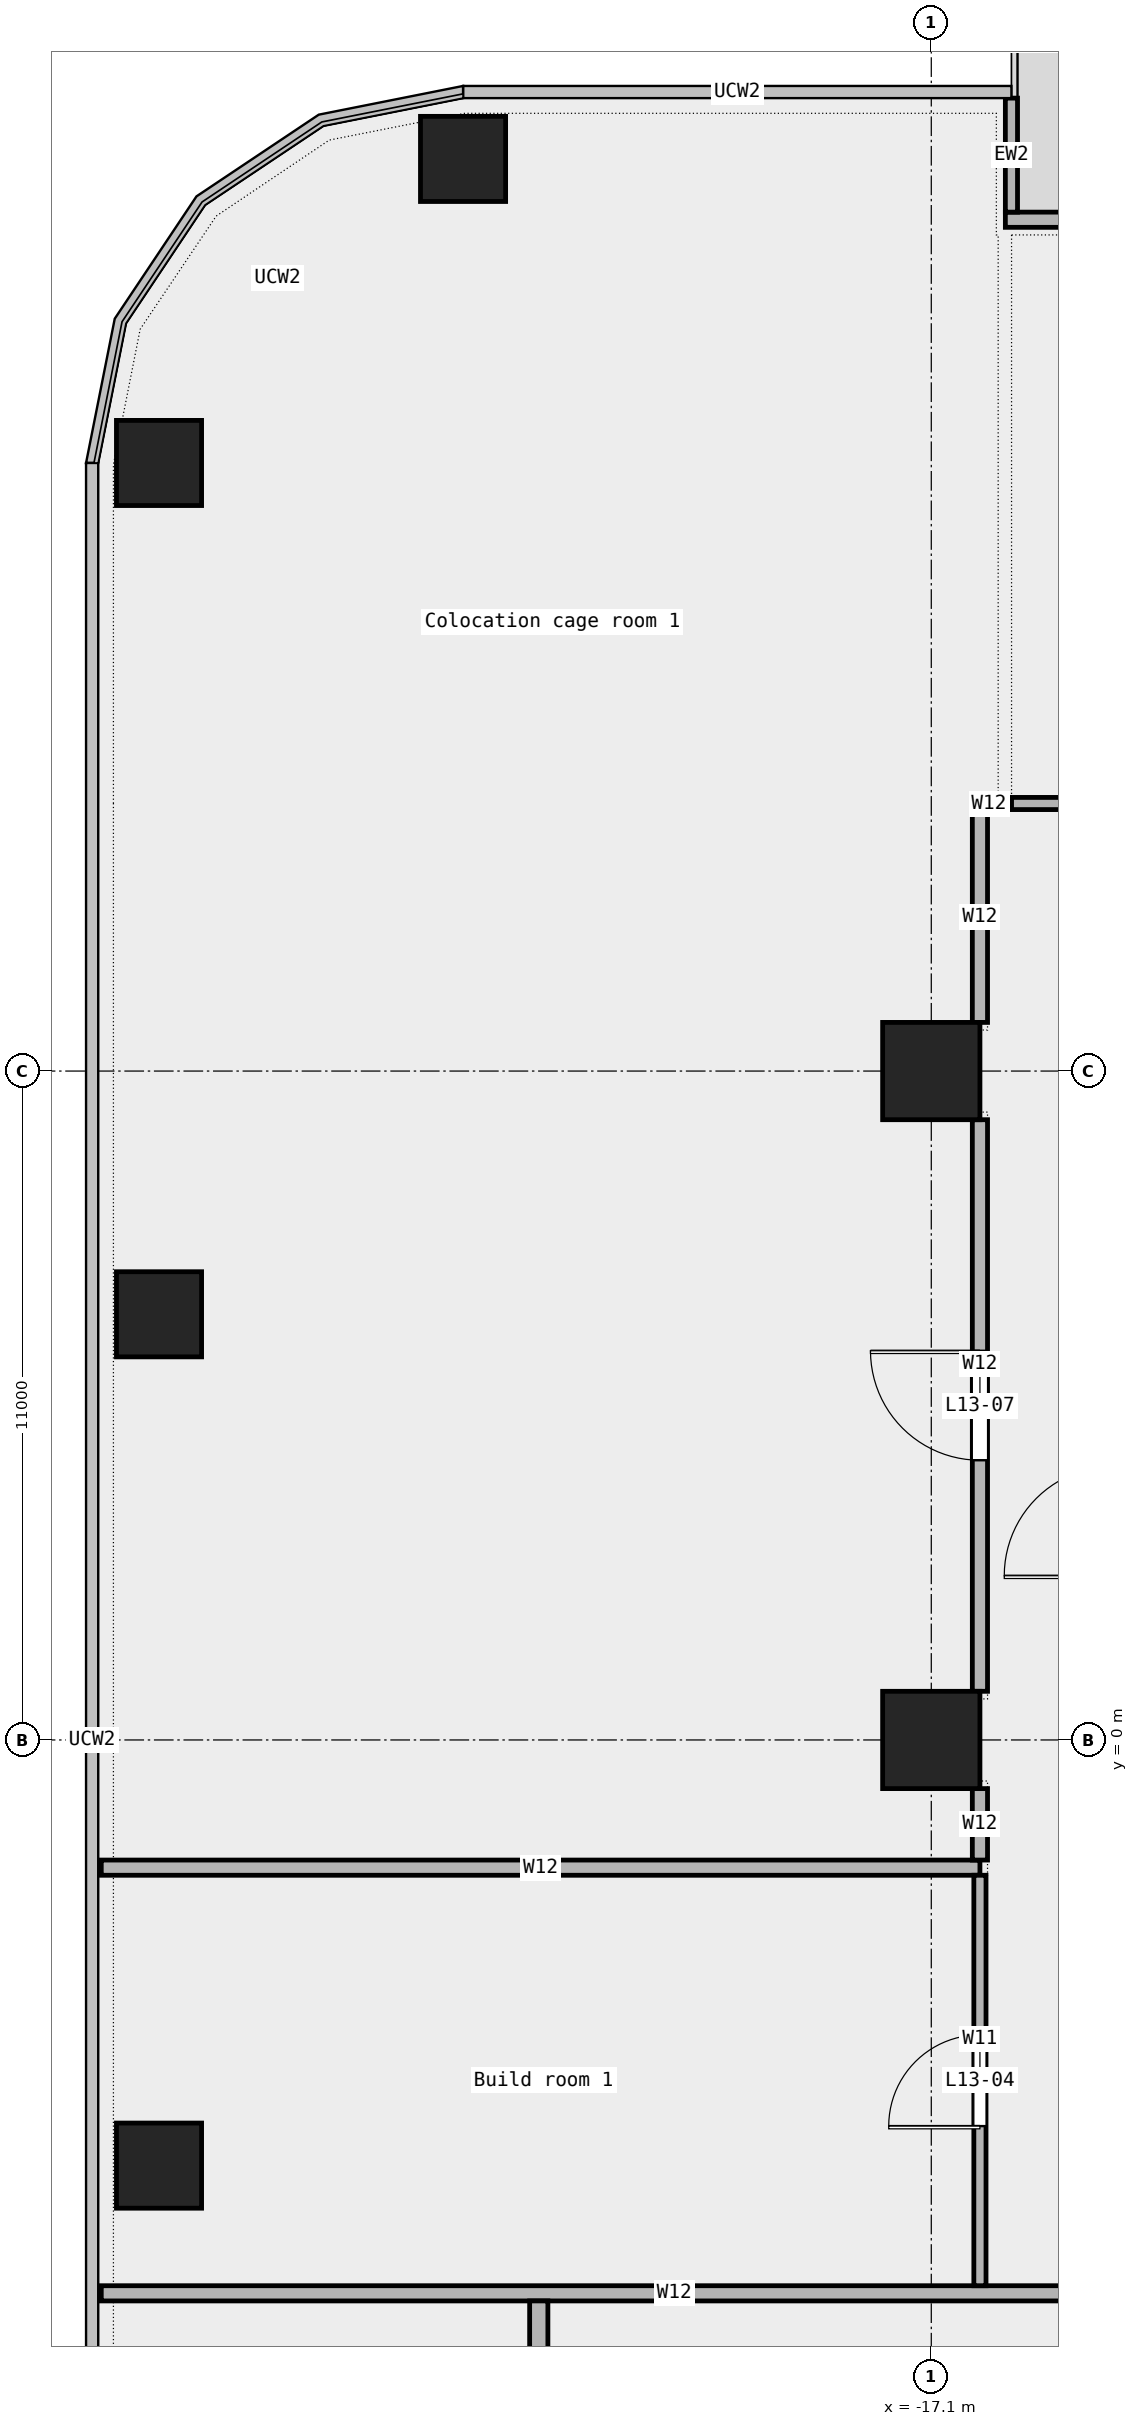
"""IFC4 building model, lengths in metres.
Left out: names, types, materials, properties, quantities, classifications, styles, units other than length and angle.
Written with IfcOpenShell. Run it as: python <this file> out.ifc"""

import sys

from ifc_helpers import new_model, si_unit, direction, frame, frame_2d, origin, origin_2d, place, context, subcontext, project, spatial, rectangle, extrude, element, fill, save


model = new_model("IFC4")
c1 = context("Model", 3, precision=1e-05, world=origin(), true_north=direction((0.0, 1.0)))
c2 = subcontext(c1, "Body", "Model", "MODEL_VIEW")
j1 = project(units=[si_unit("LENGTHUNIT", "METRE"), si_unit("PLANEANGLEUNIT", "RADIAN")], contexts=[c1])
p1 = place(None, origin())
s1 = spatial("IfcSite", under=j1, at=p1, CompositionType="ELEMENT")
p2 = place(p1, origin())
s2 = spatial("IfcBuilding", under=s1, at=p2, CompositionType="ELEMENT")
p3 = place(p2, frame((0.0, 0.0, 69.4)))
s3 = spatial("IfcBuildingStorey", under=s2, at=p3, CompositionType="ELEMENT", Elevation=69.4)
for number, where, z_axis, x_axis in (
    (1, (-24.8, 26.0, 0.0), (0.0, 0.0, 1.0), (1.0, 0.0, 0.0)),
    (2, (-29.8, 21.0, 0.0), (0.0, 0.0, 1.0), (1.0, 0.0, 0.0)),
    (3, (-29.8, 7.0, 0.0), (0.0, 0.0, 1.0), (1.0, 0.0, 0.0)),
    (4, (-29.8, -7.0, 0.0), (0.0, 0.0, 1.0), (1.0, 0.0, 0.0)),
):
    element("IfcColumn", number, at=place(p3, frame(where, z_axis=z_axis, x_axis=x_axis)), inside=s3, PredefinedType="COLUMN", context=c2, shape_type="SweptSolid", body=[
        extrude(rectangle(XDim=1.4, YDim=1.4, at=origin_2d()), origin(), (0.0, 0.0, 1.0), 4.35),
    ])
for number, where, z_axis, x_axis in (
    (5, (-17.1, 0.0, 0.0), (0.0, 0.0, 1.0), (1.0, 0.0, 0.0)),
    (6, (-17.1, 11.0, 0.0), (0.0, 0.0, 1.0), (1.0, 0.0, 0.0)),
):
    element("IfcColumn", number, at=place(p3, frame(where, z_axis=z_axis, x_axis=x_axis)), inside=s3, PredefinedType="COLUMN", context=c2, shape_type="SweptSolid", body=[
        extrude(rectangle(XDim=1.6, YDim=1.6, at=origin_2d()), origin(), (0.0, 0.0, 1.0), 4.35),
    ])
p4 = place(p3, frame((-2.155, 25.0, 0.0), z_axis=(0.0, 0.0, 1.0), x_axis=(-1.0, 0.0, 0.0)))
e7 = element("IfcWall", 7, at=p4, inside=s3, PredefinedType="STANDARD", context=c2, shape_type="SweptSolid", body=[
    extrude(rectangle(XDim=13.727, YDim=0.25, at=frame_2d((6.864, 0.0))), origin(), (0.0, 0.0, 1.0), 4.35),
])
p5 = place(p4, frame((1.75, 0.0, 0.45)))
e8 = element("IfcOpeningElement", 8, at=p5, cuts=e7, PredefinedType="OPENING", context=c2, shape_type="SweptSolid", body=[
    extrude(rectangle(XDim=1.5, YDim=3.0, at=frame_2d((0.75, 1.5))), frame((0.0, 0.137, 0.0), z_axis=(0.0, -1.0, 0.0), x_axis=(1.0, 0.0, 0.0)), (0.0, 0.0, 1.0), 0.274),
])
p6 = place(p4, frame((6.0, 0.0, 0.0)))
e9 = element("IfcOpeningElement", 9, at=p6, cuts=e7, PredefinedType="OPENING", context=c2, shape_type="SweptSolid", body=[
    extrude(rectangle(XDim=1.8, YDim=2.4, at=frame_2d((0.9, 1.2))), frame((0.0, 0.137, 0.0), z_axis=(0.0, -1.0, 0.0), x_axis=(1.0, 0.0, 0.0)), (0.0, 0.0, 1.0), 0.274),
])
p7 = place(p4, frame((11.25, 0.0, 0.45)))
e10 = element("IfcOpeningElement", 10, at=p7, cuts=e7, PredefinedType="OPENING", context=c2, shape_type="SweptSolid", body=[
    extrude(rectangle(XDim=1.5, YDim=3.0, at=frame_2d((0.75, 1.5))), frame((0.0, 0.137, 0.0), z_axis=(0.0, -1.0, 0.0), x_axis=(1.0, 0.0, 0.0)), (0.0, 0.0, 1.0), 0.274),
])
p8 = place(p3, frame((-15.782, 27.0, 0.0), z_axis=(0.0, 0.0, 1.0), x_axis=(0.0, -1.0, 0.0)))
e11 = element("IfcWall", 11, at=p8, inside=s3, PredefinedType="STANDARD", context=c2, shape_type="SweptSolid", body=[
    extrude(rectangle(XDim=1.875, YDim=0.2, at=frame_2d((0.938, 0.0))), origin(), (0.0, 0.0, 1.0), 4.35),
])
p9 = place(p3, frame((-30.75, -9.1, 0.0), z_axis=(0.0, 0.0, 1.0), x_axis=(1.0, 0.0, 0.0)))
e12 = element("IfcWall", 12, at=p9, inside=s3, PredefinedType="PARTITIONING", context=c2, shape_type="SweptSolid", body=[
    extrude(rectangle(XDim=18.85, YDim=0.25, at=frame_2d((9.425, 0.0))), origin(), (0.0, 0.0, 1.0), 4.35),
])
p10 = place(p3, frame((-30.75, -2.1, 0.0), z_axis=(0.0, 0.0, 1.0), x_axis=(1.0, 0.0, 0.0)))
e13 = element("IfcWall", 13, at=p10, inside=s3, PredefinedType="PARTITIONING", context=c2, shape_type="SweptSolid", body=[
    extrude(rectangle(XDim=14.45, YDim=0.25, at=frame_2d((7.225, 0.0))), origin(), (0.0, 0.0, 1.0), 4.35),
])
p11 = place(p3, frame((-15.78, 15.4, 0.0), z_axis=(0.0, 0.0, 1.0), x_axis=(1.0, 0.0, 0.0)))
e14 = element("IfcWall", 14, at=p11, inside=s3, PredefinedType="PARTITIONING", context=c2, shape_type="SweptSolid", body=[
    extrude(rectangle(XDim=25.965, YDim=0.2, at=frame_2d((12.982, 0.0))), origin(), (0.0, 0.0, 1.0), 4.35),
])
p12 = place(p11, frame((19.395, 0.0, 0.0)))
e15 = element("IfcOpeningElement", 15, at=p12, cuts=e14, PredefinedType="OPENING", context=c2, shape_type="SweptSolid", body=[
    extrude(rectangle(XDim=1.5, YDim=2.1, at=frame_2d((0.75, 1.05))), frame((0.0, 0.112, 0.0), z_axis=(0.0, -1.0, 0.0), x_axis=(1.0, 0.0, 0.0)), (0.0, 0.0, 1.0), 0.224),
])
p13 = place(p11, frame((6.012, 0.0, 0.0)))
e16 = element("IfcOpeningElement", 16, at=p13, cuts=e14, PredefinedType="OPENING", context=c2, shape_type="SweptSolid", body=[
    extrude(rectangle(XDim=1.5, YDim=2.1, at=frame_2d((0.75, 1.05))), frame((0.0, 0.112, 0.0), z_axis=(0.0, -1.0, 0.0), x_axis=(1.0, 0.0, 0.0)), (0.0, 0.0, 1.0), 0.224),
])
p14 = place(p3, frame((-16.3, 15.4, 0.0), z_axis=(0.0, 0.0, 1.0), x_axis=(1.0, 0.0, 0.0)))
e17 = element("IfcWall", 17, at=p14, inside=s3, PredefinedType="PARTITIONING", context=c2, shape_type="SweptSolid", body=[
    extrude(rectangle(XDim=0.3, YDim=0.25, at=frame_2d((0.15, 0.0))), origin(), (0.0, 0.0, 1.0), 4.35),
])
p15 = place(p3, frame((-23.555, -15.825, 0.0), z_axis=(0.0, 0.0, 1.0), x_axis=(0.0, 1.0, 0.0)))
e18 = element("IfcWall", 18, at=p15, inside=s3, PredefinedType="PARTITIONING", context=c2, shape_type="SweptSolid", body=[
    extrude(rectangle(XDim=6.6, YDim=0.3, at=frame_2d((3.3, 0.0))), origin(), (0.0, 0.0, 1.0), 4.35),
])
p16 = place(p3, frame((-16.3, -8.975, 0.0), z_axis=(0.0, 0.0, 1.0), x_axis=(0.0, 1.0, 0.0)))
e19 = element("IfcWall", 19, at=p16, inside=s3, PredefinedType="PARTITIONING", context=c2, shape_type="SweptSolid", body=[
    extrude(rectangle(XDim=6.75, YDim=0.2, at=frame_2d((3.375, 0.0))), origin(), (0.0, 0.0, 1.0), 4.35),
])
p17 = place(p16, frame((2.625, 0.0, 0.0)))
e20 = element("IfcOpeningElement", 20, at=p17, cuts=e19, PredefinedType="OPENING", context=c2, shape_type="SweptSolid", body=[
    extrude(rectangle(XDim=1.5, YDim=2.1, at=frame_2d((0.75, 1.05))), frame((0.0, 0.112, 0.0), z_axis=(0.0, -1.0, 0.0), x_axis=(1.0, 0.0, 0.0)), (0.0, 0.0, 1.0), 0.224),
])
p18 = place(p3, frame((-16.3, -1.975, 0.0), z_axis=(0.0, 0.0, 1.0), x_axis=(0.0, 1.0, 0.0)))
e21 = element("IfcWall", 21, at=p18, inside=s3, PredefinedType="PARTITIONING", context=c2, shape_type="SweptSolid", body=[
    extrude(rectangle(XDim=1.175, YDim=0.25, at=frame_2d((0.587, 0.0))), origin(), (0.0, 0.0, 1.0), 4.35),
])
p19 = place(p3, frame((-16.3, 0.8, 0.0), z_axis=(0.0, 0.0, 1.0), x_axis=(0.0, 1.0, 0.0)))
e22 = element("IfcWall", 22, at=p19, inside=s3, PredefinedType="PARTITIONING", context=c2, shape_type="SweptSolid", body=[
    extrude(rectangle(XDim=9.4, YDim=0.25, at=frame_2d((4.7, 0.0))), origin(), (0.0, 0.0, 1.0), 4.35),
])
p20 = place(p19, frame((3.8, 0.0, 0.0)))
e23 = element("IfcOpeningElement", 23, at=p20, cuts=e22, PredefinedType="OPENING", context=c2, shape_type="SweptSolid", body=[
    extrude(rectangle(XDim=1.8, YDim=2.1, at=frame_2d((0.9, 1.05))), frame((0.0, 0.137, 0.0), z_axis=(0.0, -1.0, 0.0), x_axis=(1.0, 0.0, 0.0)), (0.0, 0.0, 1.0), 0.274),
])
p21 = place(p3, frame((-16.3, 11.8, 0.0), z_axis=(0.0, 0.0, 1.0), x_axis=(0.0, 1.0, 0.0)))
e24 = element("IfcWall", 24, at=p21, inside=s3, PredefinedType="PARTITIONING", context=c2, shape_type="SweptSolid", body=[
    extrude(rectangle(XDim=3.475, YDim=0.25, at=frame_2d((1.737, 0.0))), origin(), (0.0, 0.0, 1.0), 4.35),
])
p22 = place(p17, origin())
e25 = element("IfcDoor", 25, at=p22, inside=s3, OperationType="DOUBLE_DOOR_SINGLE_SWING", PredefinedType="DOOR", context=c2, shape_type="SweptSolid", body=[
    extrude(rectangle(XDim=1.5, YDim=2.1, at=frame_2d((0.75, 1.05))), frame((0.0, 0.025, 0.0), z_axis=(0.0, -1.0, 0.0), x_axis=(1.0, 0.0, 0.0)), (0.0, 0.0, 1.0), 0.05),
])
fill(e20, e25)
p23 = place(p20, origin())
e26 = element("IfcDoor", 26, at=p23, inside=s3, OperationType="DOUBLE_DOOR_SINGLE_SWING", PredefinedType="DOOR", context=c2, shape_type="SweptSolid", body=[
    extrude(rectangle(XDim=1.8, YDim=2.1, at=frame_2d((0.9, 1.05))), frame((0.0, 0.025, 0.0), z_axis=(0.0, -1.0, 0.0), x_axis=(1.0, 0.0, 0.0)), (0.0, 0.0, 1.0), 0.05),
])
fill(e23, e26)
save(model, sys.argv[1])
